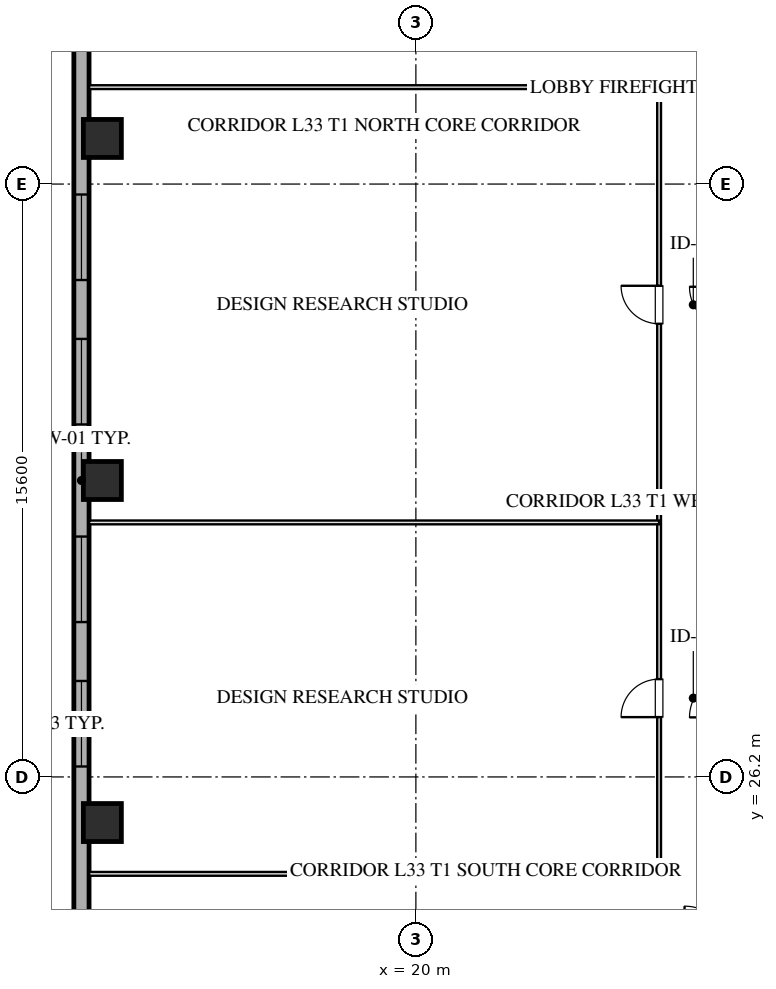
"""IFC4 building model, lengths in metres.
Left out: names, types, materials, properties, quantities, classifications, styles, units other than length and angle.
Written with IfcOpenShell. Run it as: python <this file> out.ifc"""

import sys

from ifc_helpers import new_model, si_unit, direction, frame, frame_2d, origin, origin_2d, place, context, subcontext, project, spatial, rectangle, hollow_rectangle, extrude, element, fill, save


model = new_model("IFC4")
c1 = context("Model", 3, precision=1e-05, world=origin(), true_north=direction((0.0, 1.0)))
c2 = subcontext(c1, "Body", "Model", "MODEL_VIEW")
j1 = project(units=[si_unit("LENGTHUNIT", "METRE"), si_unit("PLANEANGLEUNIT", "RADIAN")], contexts=[c1])
p1 = place(None, origin())
s1 = spatial("IfcSite", under=j1, at=p1, CompositionType="ELEMENT")
p2 = place(p1, origin())
s2 = spatial("IfcBuilding", under=s1, at=p2, CompositionType="ELEMENT")
p3 = place(p2, frame((0.0, 0.0, 127.65)))
s3 = spatial("IfcBuildingStorey", under=s2, at=p3, CompositionType="ELEMENT", Elevation=127.65)
for number, where, z_axis, x_axis in (
    (1, (11.75, 25.0, 0.0), (0.0, 0.0, 1.0), (1.0, 0.0, 0.0)),
    (2, (11.75, 34.0, 0.0), (0.0, 0.0, 1.0), (1.0, 0.0, 0.0)),
    (3, (11.75, 43.0, 0.0), (0.0, 0.0, 1.0), (1.0, 0.0, 0.0)),
):
    element("IfcColumn", number, at=place(p3, frame(where, z_axis=z_axis, x_axis=x_axis)), inside=s3, PredefinedType="COLUMN", context=c2, shape_type="SweptSolid", body=[
        extrude(hollow_rectangle(XDim=1.0, YDim=1.0, WallThickness=0.036, at=origin_2d()), origin(), (0.0, 0.0, 1.0), 3.451),
    ])
p4 = place(p3, frame((11.2, 9.0, 0.0), z_axis=(0.0, 0.0, 1.0), x_axis=(0.0, 1.0, 0.0)))
e4 = element("IfcWall", 4, at=p4, inside=s3, PredefinedType="SOLIDWALL", context=c2, shape_type="SweptSolid", body=[
    extrude(rectangle(XDim=50.0, YDim=0.4, at=frame_2d((25.0, 0.0))), origin(), (0.0, 0.0, 1.0), 2.61),
])
p5 = place(p4, frame((17.475, 0.0, 0.75)))
e5 = element("IfcOpeningElement", 5, at=p5, cuts=e4, PredefinedType="OPENING", context=c2, shape_type="SweptSolid", body=[
    extrude(rectangle(XDim=2.25, YDim=1.46, at=frame_2d((1.125, 0.73))), frame((0.0, 0.21, 0.0), z_axis=(0.0, -1.0, 0.0), x_axis=(1.0, 0.0, 0.0)), (0.0, 0.0, 1.0), 0.42),
])
p6 = place(p4, frame((21.275, 0.0, 0.75)))
e6 = element("IfcOpeningElement", 6, at=p6, cuts=e4, PredefinedType="OPENING", context=c2, shape_type="SweptSolid", body=[
    extrude(rectangle(XDim=2.25, YDim=1.46, at=frame_2d((1.125, 0.73))), frame((0.0, 0.21, 0.0), z_axis=(0.0, -1.0, 0.0), x_axis=(1.0, 0.0, 0.0)), (0.0, 0.0, 1.0), 0.42),
])
p7 = place(p4, frame((26.475, 0.0, 0.75)))
e7 = element("IfcOpeningElement", 7, at=p7, cuts=e4, PredefinedType="OPENING", context=c2, shape_type="SweptSolid", body=[
    extrude(rectangle(XDim=2.25, YDim=1.46, at=frame_2d((1.125, 0.73))), frame((0.0, 0.21, 0.0), z_axis=(0.0, -1.0, 0.0), x_axis=(1.0, 0.0, 0.0)), (0.0, 0.0, 1.0), 0.42),
])
p8 = place(p4, frame((30.275, 0.0, 0.75)))
e8 = element("IfcOpeningElement", 8, at=p8, cuts=e4, PredefinedType="OPENING", context=c2, shape_type="SweptSolid", body=[
    extrude(rectangle(XDim=2.25, YDim=1.46, at=frame_2d((1.125, 0.73))), frame((0.0, 0.21, 0.0), z_axis=(0.0, -1.0, 0.0), x_axis=(1.0, 0.0, 0.0)), (0.0, 0.0, 1.0), 0.42),
])
for number, where, z_axis, x_axis in (
    (9, (11.4, 23.65, 0.0), (0.0, 0.0, 1.0), (1.0, 0.0, 0.0)),
    (10, (11.4, 44.35, 0.0), (0.0, 0.0, 1.0), (1.0, 0.0, 0.0)),
):
    element("IfcWall", number, at=place(p3, frame(where, z_axis=z_axis, x_axis=x_axis)), inside=s3, PredefinedType="MOVABLE", context=c2, shape_type="SweptSolid", body=[
        extrude(rectangle(XDim=15.0, YDim=0.1, at=frame_2d((7.5, 0.0))), origin(), (0.0, 0.0, 1.0), 3.175),
    ])
p9 = place(p3, frame((26.4, 23.65, 0.0), z_axis=(0.0, 0.0, 1.0), x_axis=(0.0, 1.0, 0.0)))
e11 = element("IfcWall", 11, at=p9, inside=s3, PredefinedType="MOVABLE", context=c2, shape_type="SweptSolid", body=[
    extrude(rectangle(XDim=20.7, YDim=0.1, at=frame_2d((10.35, 0.0))), origin(), (0.0, 0.0, 1.0), 3.175),
])
p10 = place(p9, frame((4.124, 0.0, 0.0)))
e12 = element("IfcOpeningElement", 12, at=p10, cuts=e11, PredefinedType="OPENING", context=c2, shape_type="SweptSolid", body=[
    extrude(rectangle(XDim=1.0, YDim=2.05, at=frame_2d((0.5, 1.025))), frame((0.0, 0.06, 0.0), z_axis=(0.0, -1.0, 0.0), x_axis=(1.0, 0.0, 0.0)), (0.0, 0.0, 1.0), 0.12),
])
p11 = place(p9, frame((14.473, 0.0, 0.0)))
e13 = element("IfcOpeningElement", 13, at=p11, cuts=e11, PredefinedType="OPENING", context=c2, shape_type="SweptSolid", body=[
    extrude(rectangle(XDim=1.0, YDim=2.05, at=frame_2d((0.5, 1.025))), frame((0.0, 0.06, 0.0), z_axis=(0.0, -1.0, 0.0), x_axis=(1.0, 0.0, 0.0)), (0.0, 0.0, 1.0), 0.12),
])
p12 = place(p3, frame((11.4, 32.897, 0.0), z_axis=(0.0, 0.0, 1.0), x_axis=(1.0, 0.0, 0.0)))
e14 = element("IfcWall", 14, at=p12, inside=s3, PredefinedType="MOVABLE", context=c2, shape_type="SweptSolid", body=[
    extrude(rectangle(XDim=15.0, YDim=0.1, at=frame_2d((7.5, 0.0))), origin(), (0.0, 0.0, 1.0), 3.175),
])
p13 = place(p5, origin())
e15 = element("IfcWindow", 15, at=p13, inside=s3, PartitioningType="TRIPLE_PANEL_VERTICAL", PredefinedType="WINDOW", context=c2, shape_type="SweptSolid", body=[
    extrude(rectangle(XDim=2.25, YDim=1.46, at=frame_2d((1.125, 0.73))), frame((0.0, 0.03, 0.0), z_axis=(0.0, -1.0, 0.0), x_axis=(1.0, 0.0, 0.0)), (0.0, 0.0, 1.0), 0.06),
])
fill(e5, e15)
p14 = place(p6, origin())
e16 = element("IfcWindow", 16, at=p14, inside=s3, PartitioningType="TRIPLE_PANEL_VERTICAL", PredefinedType="WINDOW", context=c2, shape_type="SweptSolid", body=[
    extrude(rectangle(XDim=2.25, YDim=1.46, at=frame_2d((1.125, 0.73))), frame((0.0, 0.03, 0.0), z_axis=(0.0, -1.0, 0.0), x_axis=(1.0, 0.0, 0.0)), (0.0, 0.0, 1.0), 0.06),
])
fill(e6, e16)
p15 = place(p7, origin())
e17 = element("IfcWindow", 17, at=p15, inside=s3, PartitioningType="TRIPLE_PANEL_VERTICAL", PredefinedType="WINDOW", context=c2, shape_type="SweptSolid", body=[
    extrude(rectangle(XDim=2.25, YDim=1.46, at=frame_2d((1.125, 0.73))), frame((0.0, 0.03, 0.0), z_axis=(0.0, -1.0, 0.0), x_axis=(1.0, 0.0, 0.0)), (0.0, 0.0, 1.0), 0.06),
])
fill(e7, e17)
p16 = place(p8, origin())
e18 = element("IfcWindow", 18, at=p16, inside=s3, PartitioningType="TRIPLE_PANEL_VERTICAL", PredefinedType="WINDOW", context=c2, shape_type="SweptSolid", body=[
    extrude(rectangle(XDim=2.25, YDim=1.46, at=frame_2d((1.125, 0.73))), frame((0.0, 0.03, 0.0), z_axis=(0.0, -1.0, 0.0), x_axis=(1.0, 0.0, 0.0)), (0.0, 0.0, 1.0), 0.06),
])
fill(e8, e18)
p17 = place(p10, origin())
e19 = element("IfcDoor", 19, at=p17, inside=s3, OperationType="SINGLE_SWING_LEFT", PredefinedType="DOOR", context=c2, shape_type="SweptSolid", body=[
    extrude(rectangle(XDim=1.0, YDim=2.05, at=frame_2d((0.5, 1.025))), frame((0.0, 0.025, 0.0), z_axis=(0.0, -1.0, 0.0), x_axis=(1.0, 0.0, 0.0)), (0.0, 0.0, 1.0), 0.05),
])
fill(e12, e19)
p18 = place(p11, origin())
e20 = element("IfcDoor", 20, at=p18, inside=s3, OperationType="SINGLE_SWING_RIGHT", PredefinedType="DOOR", context=c2, shape_type="SweptSolid", body=[
    extrude(rectangle(XDim=1.0, YDim=2.05, at=frame_2d((0.5, 1.025))), frame((0.0, 0.025, 0.0), z_axis=(0.0, -1.0, 0.0), x_axis=(1.0, 0.0, 0.0)), (0.0, 0.0, 1.0), 0.05),
])
fill(e13, e20)
save(model, sys.argv[1])
